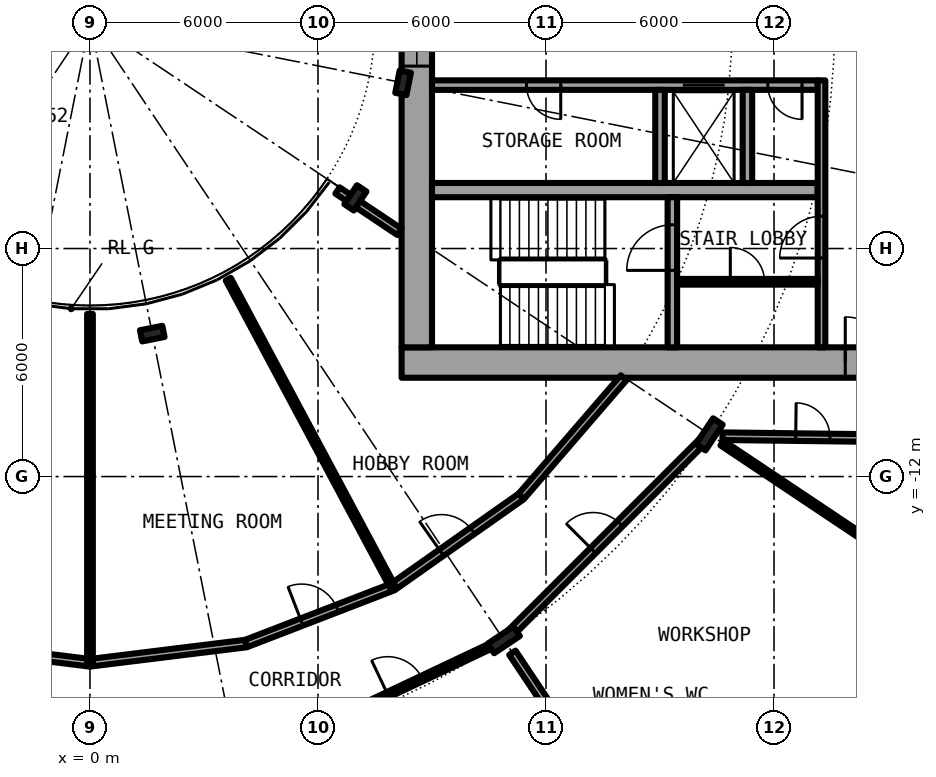
"""IFC4 building model, lengths in metres.
Left out: names, types, materials, properties, quantities, classifications, styles, units other than length and angle.
Written with IfcOpenShell. Run it as: python <this file> out.ifc"""

import sys

from ifc_helpers import new_model, si_unit, direction, frame, frame_2d, origin, origin_2d, place, context, subcontext, project, spatial, rectangle, i_section, extrude, element, fill, save


model = new_model("IFC4")
c1 = context("Model", 3, precision=1e-05, world=origin(), true_north=direction((0.0, 1.0)))
c2 = subcontext(c1, "Body", "Model", "MODEL_VIEW")
j1 = project(units=[si_unit("LENGTHUNIT", "METRE"), si_unit("PLANEANGLEUNIT", "RADIAN")], contexts=[c1])
p1 = place(None, origin())
s1 = spatial("IfcSite", under=j1, at=p1, CompositionType="ELEMENT")
p2 = place(p1, origin())
s2 = spatial("IfcBuilding", under=s1, at=p2, CompositionType="ELEMENT")
p3 = place(p2, frame((0.0, 0.0, 14.1)))
s3 = spatial("IfcBuildingStorey", under=s2, at=p3, CompositionType="ELEMENT", Elevation=14.1)
for number, where, z_axis, x_axis in (
    (1, (10.889, -16.297, 0.0), (0.0, 0.0, 1.0), (0.556, -0.831, 0.0)),
    (2, (16.297, -10.889, 0.0), (0.0, 0.0, 1.0), (0.831, -0.556, 0.0)),
):
    element("IfcColumn", number, at=place(p3, frame(where, z_axis=z_axis, x_axis=x_axis)), inside=s3, PredefinedType="COLUMN", context=c2, shape_type="SweptSolid", body=[
        extrude(i_section(OverallWidth=0.303, OverallDepth=0.814, WebThickness=0.021, FlangeThickness=0.04, FilletRadius=0.03, at=origin_2d()), origin(), (0.0, 0.0, 1.0), 4.2),
    ])
for number, where, z_axis, x_axis in (
    (3, (1.639, -8.239, 0.0), (0.0, 0.0, 1.0), (0.195, -0.981, 0.0)),
    (4, (6.984, -4.667, 0.0), (0.0, 0.0, 1.0), (0.831, -0.556, 0.0)),
    (5, (8.239, -1.639, 0.0), (0.0, 0.0, 1.0), (0.981, -0.195, 0.0)),
):
    element("IfcColumn", number, at=place(p3, frame(where, z_axis=z_axis, x_axis=x_axis)), inside=s3, PredefinedType="COLUMN", context=c2, shape_type="SweptSolid", body=[
        extrude(i_section(OverallWidth=0.3, OverallDepth=0.6, WebThickness=0.015, FlangeThickness=0.03, FilletRadius=0.027, at=origin_2d()), origin(), (0.0, 0.0, 1.0), 4.2),
    ])
p4 = place(p3, frame((8.2, -9.0, 0.0), z_axis=(0.0, 0.0, 1.0), x_axis=(1.0, 0.0, 0.0)))
e6 = element("IfcWall", 6, at=p4, inside=s3, PredefinedType="SHEAR", context=c2, shape_type="SweptSolid", body=[
    extrude(rectangle(XDim=14.2, YDim=0.8, at=frame_2d((7.1, 0.0))), origin(), (0.0, 0.0, 1.0), 4.2),
])
p5 = place(p4, frame((11.675, 0.0, 0.0)))
e7 = element("IfcOpeningElement", 7, at=p5, cuts=e6, PredefinedType="OPENING", context=c2, shape_type="SweptSolid", body=[
    extrude(rectangle(XDim=1.2, YDim=2.3, at=frame_2d((0.6, 1.15))), frame((0.0, 0.41, 0.0), z_axis=(0.0, -1.0, 0.0), x_axis=(1.0, 0.0, 0.0)), (0.0, 0.0, 1.0), 0.82),
])
p6 = place(p3, frame((8.6, -8.6, 0.0), z_axis=(0.0, 0.0, 1.0), x_axis=(0.0, 1.0, 0.0)))
e8 = element("IfcWall", 8, at=p6, inside=s3, PredefinedType="SHEAR", context=c2, shape_type="SweptSolid", body=[
    extrude(rectangle(XDim=17.2, YDim=0.8, at=frame_2d((8.6, 0.0))), origin(), (0.0, 0.0, 1.0), 4.2),
])
p7 = place(p6, frame((7.4, 0.0, 0.1)))
e9 = element("IfcOpeningElement", 9, at=p7, cuts=e8, PredefinedType="OPENING", context=c2, shape_type="SweptSolid", body=[
    extrude(rectangle(XDim=2.4, YDim=2.2, at=frame_2d((1.2, 1.1))), frame((0.0, 0.41, 0.0), z_axis=(0.0, -1.0, 0.0), x_axis=(1.0, 0.0, 0.0)), (0.0, 0.0, 1.0), 0.82),
])
p8 = place(p3, frame((19.15, -1.7, 0.0), z_axis=(0.0, 0.0, 1.0), x_axis=(-1.0, 0.0, 0.0)))
e10 = element("IfcWall", 10, at=p8, inside=s3, PredefinedType="SHEAR", context=c2, shape_type="SweptSolid", body=[
    extrude(rectangle(XDim=10.15, YDim=0.25, at=frame_2d((5.075, 0.0))), origin(), (0.0, 0.0, 1.0), 4.2),
])
p9 = place(p8, frame((2.45, 0.0, 0.0)))
e11 = element("IfcOpeningElement", 11, at=p9, cuts=e10, PredefinedType="OPENING", context=c2, shape_type="SweptSolid", body=[
    extrude(rectangle(XDim=1.1, YDim=2.3, at=frame_2d((0.55, 1.15))), frame((0.0, 0.135, 0.0), z_axis=(0.0, -1.0, 0.0), x_axis=(1.0, 0.0, 0.0)), (0.0, 0.0, 1.0), 0.27),
])
p10 = place(p8, frame((6.762, 0.0, 0.0)))
e12 = element("IfcOpeningElement", 12, at=p10, cuts=e10, PredefinedType="OPENING", context=c2, shape_type="SweptSolid", body=[
    extrude(rectangle(XDim=0.9, YDim=2.3, at=frame_2d((0.45, 1.15))), frame((0.0, 0.135, 0.0), z_axis=(0.0, -1.0, 0.0), x_axis=(1.0, 0.0, 0.0)), (0.0, 0.0, 1.0), 0.27),
])
p11 = place(p8, frame((0.413, 0.0, 0.0)))
e13 = element("IfcOpeningElement", 13, at=p11, cuts=e10, PredefinedType="OPENING", context=c2, shape_type="SweptSolid", body=[
    extrude(rectangle(XDim=0.9, YDim=2.3, at=frame_2d((0.45, 1.15))), frame((0.0, 0.135, 0.0), z_axis=(0.0, -1.0, 0.0), x_axis=(1.0, 0.0, 0.0)), (0.0, 0.0, 1.0), 0.27),
])
p12 = place(p3, frame((9.0, -4.462, 0.0), z_axis=(0.0, 0.0, 1.0), x_axis=(1.0, 0.0, 0.0)))
e14 = element("IfcWall", 14, at=p12, inside=s3, PredefinedType="SHEAR", context=c2, shape_type="SweptSolid", body=[
    extrude(rectangle(XDim=10.15, YDim=0.375, at=frame_2d((5.075, 0.0))), origin(), (0.0, 0.0, 1.0), 4.2),
])
p13 = place(p3, frame((15.325, -8.6, 0.0), z_axis=(0.0, 0.0, 1.0), x_axis=(0.0, 1.0, 0.0)))
e15 = element("IfcWall", 15, at=p13, inside=s3, PredefinedType="SHEAR", context=c2, shape_type="SweptSolid", body=[
    extrude(rectangle(XDim=3.95, YDim=0.25, at=frame_2d((1.975, 0.0))), origin(), (0.0, 0.0, 1.0), 4.2),
])
p14 = place(p13, frame((2.025, 0.0, 0.0)))
e16 = element("IfcOpeningElement", 16, at=p14, cuts=e15, PredefinedType="OPENING", context=c2, shape_type="SweptSolid", body=[
    extrude(rectangle(XDim=1.2, YDim=2.3, at=frame_2d((0.6, 1.15))), frame((0.0, 0.135, 0.0), z_axis=(0.0, -1.0, 0.0), x_axis=(1.0, 0.0, 0.0)), (0.0, 0.0, 1.0), 0.27),
])
for number, where, z_axis, x_axis in (
    (17, (15.0, -1.825, 0.0), (0.0, 0.0, 1.0), (0.0, -1.0, 0.0)),
    (18, (17.3, -1.825, 0.0), (0.0, 0.0, 1.0), (0.0, -1.0, 0.0)),
):
    element("IfcWall", number, at=place(p3, frame(where, z_axis=z_axis, x_axis=x_axis)), inside=s3, PredefinedType="SOLIDWALL", context=c2, shape_type="SweptSolid", body=[
        extrude(rectangle(XDim=2.45, YDim=0.25, at=frame_2d((1.225, 0.0))), origin(), (0.0, 0.0, 1.0), 3.8),
    ])
p15 = place(p3, frame((19.25, -8.6, 0.0), z_axis=(0.0, 0.0, 1.0), x_axis=(0.0, 1.0, 0.0)))
e19 = element("IfcWall", 19, at=p15, inside=s3, PredefinedType="SOLIDWALL", context=c2, shape_type="SweptSolid", body=[
    extrude(rectangle(XDim=7.025, YDim=0.2, at=frame_2d((3.513, 0.0))), origin(), (0.0, 0.0, 1.0), 3.8),
])
p16 = place(p15, frame((2.35, 0.0, 0.0)))
e20 = element("IfcOpeningElement", 20, at=p16, cuts=e19, PredefinedType="OPENING", context=c2, shape_type="SweptSolid", body=[
    extrude(rectangle(XDim=1.1, YDim=2.3, at=frame_2d((0.55, 1.15))), frame((0.0, 0.11, 0.0), z_axis=(0.0, -1.0, 0.0), x_axis=(1.0, 0.0, 0.0)), (0.0, 0.0, 1.0), 0.22),
])
p17 = place(p3, frame((15.45, -6.875, 0.0), z_axis=(0.0, 0.0, 1.0), x_axis=(1.0, 0.0, 0.0)))
e21 = element("IfcWall", 21, at=p17, inside=s3, PredefinedType="PARTITIONING", context=c2, shape_type="SweptSolid", body=[
    extrude(rectangle(XDim=3.7, YDim=0.15, at=frame_2d((1.85, 0.0))), origin(), (0.0, 0.0, 1.0), 3.8),
])
p18 = place(p17, frame((1.4, 0.0, 0.0)))
e22 = element("IfcOpeningElement", 22, at=p18, cuts=e21, PredefinedType="OPENING", context=c2, shape_type="SweptSolid", body=[
    extrude(rectangle(XDim=0.9, YDim=2.3, at=frame_2d((0.45, 1.15))), frame((0.0, 0.085, 0.0), z_axis=(0.0, -1.0, 0.0), x_axis=(1.0, 0.0, 0.0)), (0.0, 0.0, 1.0), 0.17),
])
p19 = place(p3, frame((5.69, -18.756, 0.0), z_axis=(0.0, 0.0, 1.0), x_axis=(0.903965018344, 0.42760641437, 0.0)))
e23 = element("IfcWall", 23, at=p19, inside=s3, PredefinedType="PARTITIONING", context=c2, shape_type="SweptSolid", body=[
    extrude(rectangle(XDim=5.599, YDim=0.15, at=frame_2d((2.799, 0.0))), origin(), (0.0, 0.0, 1.0), 3.38),
])
p20 = place(p19, frame((2.376, 0.0, 0.0)))
e24 = element("IfcOpeningElement", 24, at=p20, cuts=e23, PredefinedType="OPENING", context=c2, shape_type="SweptSolid", body=[
    extrude(rectangle(XDim=1.0, YDim=2.3, at=frame_2d((0.5, 1.15))), frame((0.0, 0.085, 0.0), z_axis=(0.0, -1.0, 0.0), x_axis=(1.0, 0.0, 0.0)), (0.0, 0.0, 1.0), 0.17),
])
p21 = place(p3, frame((10.998, -16.188, 0.0), z_axis=(0.0, 0.0, 1.0), x_axis=(0.707106781187, 0.707106781187, 0.0)))
e25 = element("IfcWall", 25, at=p21, inside=s3, PredefinedType="PARTITIONING", context=c2, shape_type="SweptSolid", body=[
    extrude(rectangle(XDim=7.34, YDim=0.2, at=frame_2d((3.67, 0.0))), origin(), (0.0, 0.0, 1.0), 3.38),
])
p22 = place(p21, frame((3.17, 0.0, 0.0)))
e26 = element("IfcOpeningElement", 26, at=p22, cuts=e25, PredefinedType="OPENING", context=c2, shape_type="SweptSolid", body=[
    extrude(rectangle(XDim=1.0, YDim=2.3, at=frame_2d((0.5, 1.15))), frame((0.0, 0.11, 0.0), z_axis=(0.0, -1.0, 0.0), x_axis=(1.0, 0.0, 0.0)), (0.0, 0.0, 1.0), 0.22),
])
for number, where, z_axis, x_axis in (
    (27, (-4.106, -16.394, 0.0), (0.0, 0.0, 1.0), (0.992, -0.122, 0.0)),
    (28, (0.0, -16.9, 0.0), (0.0, 0.0, 1.0), (0.992, 0.122, 0.0)),
):
    element("IfcWall", number, at=place(p3, frame(where, z_axis=z_axis, x_axis=x_axis)), inside=s3, PredefinedType="PARTITIONING", context=c2, shape_type="SweptSolid", body=[
        extrude(rectangle(XDim=4.137, YDim=0.2, at=frame_2d((2.068, 0.0))), origin(), (0.0, 0.0, 1.0), 3.8),
    ])
p23 = place(p3, frame((4.106, -16.394, 0.0), z_axis=(0.0, 0.0, 1.0), x_axis=(0.932943640288, 0.360022449363, 0.0)))
e29 = element("IfcWall", 29, at=p23, inside=s3, PredefinedType="PARTITIONING", context=c2, shape_type="SweptSolid", body=[
    extrude(rectangle(XDim=4.139, YDim=0.2, at=frame_2d((2.069, 0.0))), origin(), (0.0, 0.0, 1.0), 3.8),
])
p24 = place(p23, frame((1.569, 0.0, 0.0)))
e30 = element("IfcOpeningElement", 30, at=p24, cuts=e29, PredefinedType="OPENING", context=c2, shape_type="SweptSolid", body=[
    extrude(rectangle(XDim=1.0, YDim=2.3, at=frame_2d((0.5, 1.15))), frame((0.0, 0.11, 0.0), z_axis=(0.0, -1.0, 0.0), x_axis=(1.0, 0.0, 0.0)), (0.0, 0.0, 1.0), 0.22),
])
p25 = place(p3, frame((7.967, -14.904, 0.0), z_axis=(0.0, 0.0, 1.0), x_axis=(0.817567680547, 0.575832517079, 0.0)))
e31 = element("IfcWall", 31, at=p25, inside=s3, PredefinedType="PARTITIONING", context=c2, shape_type="SweptSolid", body=[
    extrude(rectangle(XDim=4.137, YDim=0.2, at=frame_2d((2.068, 0.0))), origin(), (0.0, 0.0, 1.0), 3.8),
])
p26 = place(p25, frame((1.568, 0.0, 0.0)))
e32 = element("IfcOpeningElement", 32, at=p26, cuts=e31, PredefinedType="OPENING", context=c2, shape_type="SweptSolid", body=[
    extrude(rectangle(XDim=1.0, YDim=2.3, at=frame_2d((0.5, 1.15))), frame((0.0, 0.11, 0.0), z_axis=(0.0, -1.0, 0.0), x_axis=(1.0, 0.0, 0.0)), (0.0, 0.0, 1.0), 0.22),
])
p27 = place(p3, frame((11.349, -12.522, 0.0), z_axis=(0.0, 0.0, 1.0), x_axis=(0.653274518104, 0.757121129012, 0.0)))
e33 = element("IfcWall", 33, at=p27, inside=s3, PredefinedType="PARTITIONING", context=c2, shape_type="SweptSolid", body=[
    extrude(rectangle(XDim=4.124, YDim=0.2, at=frame_2d((2.062, 0.0))), origin(), (0.0, 0.0, 1.0), 3.8),
])
p28 = place(p3, frame((16.643, -10.938, 0.0), z_axis=(0.0, 0.0, 1.0), x_axis=(0.999924074118, -0.012322580895, 0.0)))
e34 = element("IfcWall", 34, at=p28, inside=s3, PredefinedType="PARTITIONING", context=c2, shape_type="SweptSolid", body=[
    extrude(rectangle(XDim=5.032, YDim=0.2, at=frame_2d((2.516, 0.0))), origin(), (0.0, 0.0, 1.0), 3.8),
])
p29 = place(p28, frame((1.928, 0.0, 0.0)))
e35 = element("IfcOpeningElement", 35, at=p29, cuts=e34, PredefinedType="OPENING", context=c2, shape_type="SweptSolid", body=[
    extrude(rectangle(XDim=0.9, YDim=2.3, at=frame_2d((0.45, 1.15))), frame((0.0, 0.11, 0.0), z_axis=(0.0, -1.0, 0.0), x_axis=(1.0, 0.0, 0.0)), (0.0, 0.0, 1.0), 0.22),
])
p30 = place(p3, frame((6.513, -4.472, 0.0), z_axis=(0.0, 0.0, 1.0), x_axis=(0.831417956244, -0.555647533996, 0.0)))
e36 = element("IfcWall", 36, at=p30, inside=s3, PredefinedType="PARTITIONING", context=c2, shape_type="SweptSolid", body=[
    extrude(rectangle(XDim=1.962, YDim=0.2, at=frame_2d((0.981, 0.0))), origin(), (0.0, 0.0, 1.0), 3.8),
])
p31 = place(p3, frame((0.0, -16.9, 0.0), z_axis=(0.0, 0.0, 1.0), x_axis=(0.0, 1.0, 0.0)))
e37 = element("IfcWall", 37, at=p31, inside=s3, PredefinedType="PARTITIONING", context=c2, shape_type="SweptSolid", body=[
    extrude(rectangle(XDim=9.18, YDim=0.15, at=frame_2d((4.59, 0.0))), origin(), (0.0, 0.0, 1.0), 3.8),
])
p32 = place(p3, frame((3.639, -6.808, 0.0), z_axis=(0.0, 0.0, 1.0), x_axis=(0.471460365694, -0.881887251059, 0.0)))
e38 = element("IfcWall", 38, at=p32, inside=s3, PredefinedType="PARTITIONING", context=c2, shape_type="SweptSolid", body=[
    extrude(rectangle(XDim=9.18, YDim=0.15, at=frame_2d((4.59, 0.0))), origin(), (0.0, 0.0, 1.0), 3.8),
])
p33 = place(p3, frame((11.115, -16.635, 0.0), z_axis=(0.0, 0.0, 1.0), x_axis=(0.555491592772, -0.831522152657, 0.0)))
e39 = element("IfcWall", 39, at=p33, inside=s3, PredefinedType="PARTITIONING", context=c2, shape_type="SweptSolid", body=[
    extrude(rectangle(XDim=1.993, YDim=0.2, at=frame_2d((0.996, 0.0))), origin(), (0.0, 0.0, 1.0), 3.8),
])
p34 = place(p3, frame((16.633, -11.118, 0.0), z_axis=(0.0, 0.0, 1.0), x_axis=(0.831415754305, -0.555650828752, 0.0)))
e40 = element("IfcWall", 40, at=p34, inside=s3, PredefinedType="PARTITIONING", context=c2, shape_type="SweptSolid", body=[
    extrude(rectangle(XDim=7.168, YDim=0.15, at=frame_2d((3.584, 0.0))), origin(), (0.0, 0.0, 1.0), 3.8),
])
p35 = place(p9, origin())
e41 = element("IfcDoor", 41, at=p35, inside=s3, OperationType="DOUBLE_DOOR_SLIDING", PredefinedType="DOOR", context=c2, shape_type="SweptSolid", body=[
    extrude(rectangle(XDim=1.1, YDim=2.3, at=frame_2d((0.55, 1.15))), frame((0.0, 0.025, 0.0), z_axis=(0.0, -1.0, 0.0), x_axis=(1.0, 0.0, 0.0)), (0.0, 0.0, 1.0), 0.05),
])
fill(e11, e41)
p36 = place(p10, origin())
e42 = element("IfcDoor", 42, at=p36, inside=s3, OperationType="SINGLE_SWING_LEFT", PredefinedType="DOOR", context=c2, shape_type="SweptSolid", body=[
    extrude(rectangle(XDim=0.9, YDim=2.3, at=frame_2d((0.45, 1.15))), frame((0.0, 0.025, 0.0), z_axis=(0.0, -1.0, 0.0), x_axis=(1.0, 0.0, 0.0)), (0.0, 0.0, 1.0), 0.05),
])
fill(e12, e42)
p37 = place(p11, origin())
e43 = element("IfcDoor", 43, at=p37, inside=s3, OperationType="SINGLE_SWING_RIGHT", PredefinedType="DOOR", context=c2, shape_type="SweptSolid", body=[
    extrude(rectangle(XDim=0.9, YDim=2.3, at=frame_2d((0.45, 1.15))), frame((0.0, 0.025, 0.0), z_axis=(0.0, -1.0, 0.0), x_axis=(1.0, 0.0, 0.0)), (0.0, 0.0, 1.0), 0.05),
])
fill(e13, e43)
p38 = place(p18, origin())
e44 = element("IfcDoor", 44, at=p38, inside=s3, OperationType="SINGLE_SWING_LEFT", PredefinedType="DOOR", context=c2, shape_type="SweptSolid", body=[
    extrude(rectangle(XDim=0.9, YDim=2.3, at=frame_2d((0.45, 1.15))), frame((0.0, 0.025, 0.0), z_axis=(0.0, -1.0, 0.0), x_axis=(1.0, 0.0, 0.0)), (0.0, 0.0, 1.0), 0.05),
])
fill(e22, e44)
p39 = place(p14, origin())
e45 = element("IfcDoor", 45, at=p39, inside=s3, OperationType="SINGLE_SWING_LEFT", PredefinedType="DOOR", context=c2, shape_type="SweptSolid", body=[
    extrude(rectangle(XDim=1.2, YDim=2.3, at=frame_2d((0.6, 1.15))), frame((0.0, 0.025, 0.0), z_axis=(0.0, -1.0, 0.0), x_axis=(1.0, 0.0, 0.0)), (0.0, 0.0, 1.0), 0.05),
])
fill(e16, e45)
p40 = place(p16, origin())
e46 = element("IfcDoor", 46, at=p40, inside=s3, OperationType="SINGLE_SWING_RIGHT", PredefinedType="DOOR", context=c2, shape_type="SweptSolid", body=[
    extrude(rectangle(XDim=1.1, YDim=2.3, at=frame_2d((0.55, 1.15))), frame((0.0, 0.025, 0.0), z_axis=(0.0, -1.0, 0.0), x_axis=(1.0, 0.0, 0.0)), (0.0, 0.0, 1.0), 0.05),
])
fill(e20, e46)
p41 = place(p5, origin())
e47 = element("IfcDoor", 47, at=p41, inside=s3, OperationType="SINGLE_SWING_LEFT", PredefinedType="DOOR", context=c2, shape_type="SweptSolid", body=[
    extrude(rectangle(XDim=1.2, YDim=2.3, at=frame_2d((0.6, 1.15))), frame((0.0, 0.025, 0.0), z_axis=(0.0, -1.0, 0.0), x_axis=(1.0, 0.0, 0.0)), (0.0, 0.0, 1.0), 0.05),
])
fill(e7, e47)
p42 = place(p7, origin())
e48 = element("IfcWindow", 48, at=p42, inside=s3, PartitioningType="SINGLE_PANEL", PredefinedType="WINDOW", context=c2, shape_type="SweptSolid", body=[
    extrude(rectangle(XDim=2.4, YDim=2.2, at=frame_2d((1.2, 1.1))), frame((0.0, 0.03, 0.0), z_axis=(0.0, -1.0, 0.0), x_axis=(1.0, 0.0, 0.0)), (0.0, 0.0, 1.0), 0.06),
])
fill(e9, e48)
p43 = place(p20, origin())
e49 = element("IfcDoor", 49, at=p43, inside=s3, OperationType="SINGLE_SWING_RIGHT", PredefinedType="DOOR", context=c2, shape_type="SweptSolid", body=[
    extrude(rectangle(XDim=1.0, YDim=2.3, at=frame_2d((0.5, 1.15))), frame((0.0, 0.025, 0.0), z_axis=(0.0, -1.0, 0.0), x_axis=(1.0, 0.0, 0.0)), (0.0, 0.0, 1.0), 0.05),
])
fill(e24, e49)
p44 = place(p22, origin())
e50 = element("IfcDoor", 50, at=p44, inside=s3, OperationType="SINGLE_SWING_LEFT", PredefinedType="DOOR", context=c2, shape_type="SweptSolid", body=[
    extrude(rectangle(XDim=1.0, YDim=2.3, at=frame_2d((0.5, 1.15))), frame((0.0, 0.025, 0.0), z_axis=(0.0, -1.0, 0.0), x_axis=(1.0, 0.0, 0.0)), (0.0, 0.0, 1.0), 0.05),
])
fill(e26, e50)
p45 = place(p24, origin())
e51 = element("IfcDoor", 51, at=p45, inside=s3, OperationType="SINGLE_SWING_RIGHT", PredefinedType="DOOR", context=c2, shape_type="SweptSolid", body=[
    extrude(rectangle(XDim=1.0, YDim=2.3, at=frame_2d((0.5, 1.15))), frame((0.0, 0.025, 0.0), z_axis=(0.0, -1.0, 0.0), x_axis=(1.0, 0.0, 0.0)), (0.0, 0.0, 1.0), 0.05),
])
fill(e30, e51)
p46 = place(p26, origin())
e52 = element("IfcDoor", 52, at=p46, inside=s3, OperationType="SINGLE_SWING_RIGHT", PredefinedType="DOOR", context=c2, shape_type="SweptSolid", body=[
    extrude(rectangle(XDim=1.0, YDim=2.3, at=frame_2d((0.5, 1.15))), frame((0.0, 0.025, 0.0), z_axis=(0.0, -1.0, 0.0), x_axis=(1.0, 0.0, 0.0)), (0.0, 0.0, 1.0), 0.05),
])
fill(e32, e52)
p47 = place(p29, origin())
e53 = element("IfcDoor", 53, at=p47, inside=s3, OperationType="SINGLE_SWING_LEFT", PredefinedType="DOOR", context=c2, shape_type="SweptSolid", body=[
    extrude(rectangle(XDim=0.9, YDim=2.3, at=frame_2d((0.45, 1.15))), frame((0.0, 0.025, 0.0), z_axis=(0.0, -1.0, 0.0), x_axis=(1.0, 0.0, 0.0)), (0.0, 0.0, 1.0), 0.05),
])
fill(e35, e53)
save(model, sys.argv[1])
